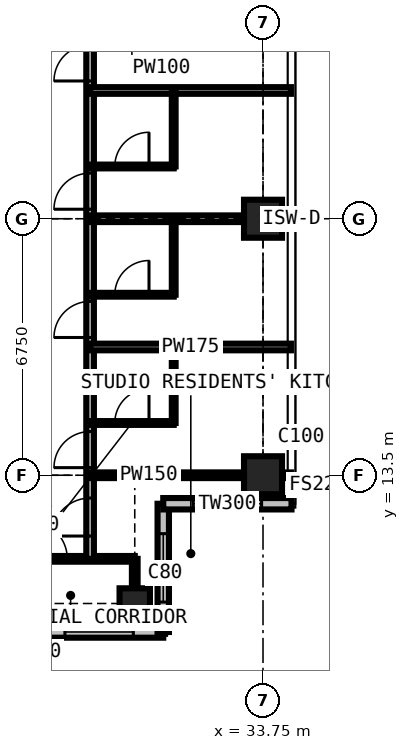
"""IFC4 building model, lengths in metres.
Left out: names, types, materials, properties, quantities, classifications, styles, units other than length and angle.
Written with IfcOpenShell. Run it as: python <this file> out.ifc"""

import sys

from ifc_helpers import new_model, si_unit, direction, frame, frame_2d, origin, origin_2d, place, context, subcontext, project, spatial, rectangle, extrude, element, fill, save


model = new_model("IFC4")
c1 = context("Model", 3, precision=1e-05, world=origin(), true_north=direction((0.0, 1.0)))
c2 = subcontext(c1, "Body", "Model", "MODEL_VIEW")
j1 = project(units=[si_unit("LENGTHUNIT", "METRE"), si_unit("PLANEANGLEUNIT", "RADIAN")], contexts=[c1])
p1 = place(None, origin())
s1 = spatial("IfcSite", under=j1, at=p1, CompositionType="ELEMENT")
p2 = place(p1, origin())
s2 = spatial("IfcBuilding", under=s1, at=p2, CompositionType="ELEMENT")
p3 = place(p2, frame((0.0, 0.0, 240.3)))
s3 = spatial("IfcBuildingStorey", under=s2, at=p3, CompositionType="ELEMENT", Elevation=240.3)
p4 = place(p3, frame((30.375, 10.125, 0.0), z_axis=(0.0, 0.0, 1.0), x_axis=(1.0, 0.0, 0.0)))
e1 = element("IfcColumn", 1, at=p4, inside=s3, PredefinedType="COLUMN", context=c2, shape_type="SweptSolid", body=[
    extrude(rectangle(XDim=0.8, YDim=0.8, at=origin_2d()), origin(), (0.0, 0.0, 1.0), 3.6),
])
for number, where, z_axis, x_axis in (
    (2, (33.75, 13.5, 0.0), (0.0, 0.0, 1.0), (1.0, 0.0, 0.0)),
    (3, (33.75, 20.25, 0.0), (0.0, 0.0, 1.0), (1.0, 0.0, 0.0)),
):
    element("IfcColumn", number, at=place(p3, frame(where, z_axis=z_axis, x_axis=x_axis)), inside=s3, PredefinedType="COLUMN", context=c2, shape_type="SweptSolid", body=[
        extrude(rectangle(XDim=1.0, YDim=1.0, at=origin_2d()), origin(), (0.0, 0.0, 1.0), 3.6),
    ])
p5 = place(p3, frame((27.75, 9.375, 0.0), z_axis=(0.0, 0.0, 1.0), x_axis=(1.0, 0.0, 0.0)))
e4 = element("IfcWall", 4, at=p5, inside=s3, PredefinedType="SOLIDWALL", context=c2, shape_type="SweptSolid", body=[
    extrude(rectangle(XDim=3.375, YDim=0.3, at=frame_2d((1.688, 0.0))), origin(), (0.0, 0.0, 1.0), 3.375),
])
p6 = place(p5, frame((0.788, 0.0, 0.6)))
e5 = element("IfcOpeningElement", 5, at=p6, cuts=e4, PredefinedType="OPENING", context=c2, shape_type="SweptSolid", body=[
    extrude(rectangle(XDim=1.8, YDim=2.1, at=frame_2d((0.9, 1.05))), frame((0.0, 0.16, 0.0), z_axis=(0.0, -1.0, 0.0), x_axis=(1.0, 0.0, 0.0)), (0.0, 0.0, 1.0), 0.32),
])
p7 = place(p3, frame((31.125, 9.375, 0.0), z_axis=(0.0, 0.0, 1.0), x_axis=(0.0, 1.0, 0.0)))
e6 = element("IfcWall", 6, at=p7, inside=s3, PredefinedType="SOLIDWALL", context=c2, shape_type="SweptSolid", body=[
    extrude(rectangle(XDim=3.375, YDim=0.3, at=frame_2d((1.688, 0.0))), origin(), (0.0, 0.0, 1.0), 3.375),
])
p8 = place(p7, frame((0.788, 0.0, 0.6)))
e7 = element("IfcOpeningElement", 7, at=p8, cuts=e6, PredefinedType="OPENING", context=c2, shape_type="SweptSolid", body=[
    extrude(rectangle(XDim=1.8, YDim=2.1, at=frame_2d((0.9, 1.05))), frame((0.0, 0.16, 0.0), z_axis=(0.0, -1.0, 0.0), x_axis=(1.0, 0.0, 0.0)), (0.0, 0.0, 1.0), 0.32),
])
p9 = place(p3, frame((31.125, 12.75, 0.0), z_axis=(0.0, 0.0, 1.0), x_axis=(1.0, 0.0, 0.0)))
e8 = element("IfcWall", 8, at=p9, inside=s3, PredefinedType="SOLIDWALL", context=c2, shape_type="SweptSolid", body=[
    extrude(rectangle(XDim=3.375, YDim=0.3, at=frame_2d((1.688, 0.0))), origin(), (0.0, 0.0, 1.0), 3.375),
])
p10 = place(p9, frame((0.788, 0.0, 0.6)))
e9 = element("IfcOpeningElement", 9, at=p10, cuts=e8, PredefinedType="OPENING", context=c2, shape_type="SweptSolid", body=[
    extrude(rectangle(XDim=1.8, YDim=2.1, at=frame_2d((0.9, 1.05))), frame((0.0, 0.16, 0.0), z_axis=(0.0, -1.0, 0.0), x_axis=(1.0, 0.0, 0.0)), (0.0, 0.0, 1.0), 0.32),
])
p11 = place(p3, frame((10.125, 11.3, 0.0), z_axis=(0.0, 0.0, 1.0), x_axis=(1.0, 0.0, 0.0)))
e10 = element("IfcWall", 10, at=p11, inside=s3, PredefinedType="PARTITIONING", context=c2, shape_type="SweptSolid", body=[
    extrude(rectangle(XDim=20.25, YDim=0.15, at=frame_2d((10.125, 0.0))), origin(), (0.0, 0.0, 1.0), 3.375),
])
p12 = place(p11, frame((6.95, 0.0, 0.0)))
e11 = element("IfcOpeningElement", 11, at=p12, cuts=e10, PredefinedType="OPENING", context=c2, shape_type="SweptSolid", body=[
    extrude(rectangle(XDim=0.95, YDim=2.2, at=frame_2d((0.475, 1.1))), frame((0.0, 0.085, 0.0), z_axis=(0.0, -1.0, 0.0), x_axis=(1.0, 0.0, 0.0)), (0.0, 0.0, 1.0), 0.17),
])
p13 = place(p11, frame((10.375, 0.0, 0.0)))
e12 = element("IfcOpeningElement", 12, at=p13, cuts=e10, PredefinedType="OPENING", context=c2, shape_type="SweptSolid", body=[
    extrude(rectangle(XDim=0.95, YDim=2.2, at=frame_2d((0.475, 1.1))), frame((0.0, 0.085, 0.0), z_axis=(0.0, -1.0, 0.0), x_axis=(1.0, 0.0, 0.0)), (0.0, 0.0, 1.0), 0.17),
])
p14 = place(p11, frame((13.75, 0.0, 0.0)))
e13 = element("IfcOpeningElement", 13, at=p14, cuts=e10, PredefinedType="OPENING", context=c2, shape_type="SweptSolid", body=[
    extrude(rectangle(XDim=0.95, YDim=2.2, at=frame_2d((0.475, 1.1))), frame((0.0, 0.085, 0.0), z_axis=(0.0, -1.0, 0.0), x_axis=(1.0, 0.0, 0.0)), (0.0, 0.0, 1.0), 0.17),
])
p15 = place(p11, frame((17.475, 0.0, 0.0)))
e14 = element("IfcOpeningElement", 14, at=p15, cuts=e10, PredefinedType="OPENING", context=c2, shape_type="SweptSolid", body=[
    extrude(rectangle(XDim=1.0, YDim=2.2, at=frame_2d((0.5, 1.1))), frame((0.0, 0.085, 0.0), z_axis=(0.0, -1.0, 0.0), x_axis=(1.0, 0.0, 0.0)), (0.0, 0.0, 1.0), 0.17),
])
p16 = place(p3, frame((29.2, 11.3, 0.0), z_axis=(0.0, 0.0, 1.0), x_axis=(0.0, 1.0, 0.0)))
e15 = element("IfcWall", 15, at=p16, inside=s3, PredefinedType="PARTITIONING", context=c2, shape_type="SweptSolid", body=[
    extrude(rectangle(XDim=17.9, YDim=0.2, at=frame_2d((8.95, 0.0))), origin(), (0.0, 0.0, 1.0), 3.375),
])
p17 = place(p16, frame((0.6, 0.0, 0.0)))
e16 = element("IfcOpeningElement", 16, at=p17, cuts=e15, PredefinedType="OPENING", context=c2, shape_type="SweptSolid", body=[
    extrude(rectangle(XDim=1.0, YDim=2.2, at=frame_2d((0.5, 1.1))), frame((0.0, 0.11, 0.0), z_axis=(0.0, -1.0, 0.0), x_axis=(1.0, 0.0, 0.0)), (0.0, 0.0, 1.0), 0.22),
])
p18 = place(p16, frame((2.4, 0.0, 0.0)))
e17 = element("IfcOpeningElement", 17, at=p18, cuts=e15, PredefinedType="OPENING", context=c2, shape_type="SweptSolid", body=[
    extrude(rectangle(XDim=0.95, YDim=2.2, at=frame_2d((0.475, 1.1))), frame((0.0, 0.11, 0.0), z_axis=(0.0, -1.0, 0.0), x_axis=(1.0, 0.0, 0.0)), (0.0, 0.0, 1.0), 0.22),
])
p19 = place(p16, frame((5.825, 0.0, 0.0)))
e18 = element("IfcOpeningElement", 18, at=p19, cuts=e15, PredefinedType="OPENING", context=c2, shape_type="SweptSolid", body=[
    extrude(rectangle(XDim=0.95, YDim=2.2, at=frame_2d((0.475, 1.1))), frame((0.0, 0.11, 0.0), z_axis=(0.0, -1.0, 0.0), x_axis=(1.0, 0.0, 0.0)), (0.0, 0.0, 1.0), 0.22),
])
p20 = place(p16, frame((9.2, 0.0, 0.0)))
e19 = element("IfcOpeningElement", 19, at=p20, cuts=e15, PredefinedType="OPENING", context=c2, shape_type="SweptSolid", body=[
    extrude(rectangle(XDim=0.95, YDim=2.2, at=frame_2d((0.475, 1.1))), frame((0.0, 0.11, 0.0), z_axis=(0.0, -1.0, 0.0), x_axis=(1.0, 0.0, 0.0)), (0.0, 0.0, 1.0), 0.22),
])
p21 = place(p16, frame((12.575, 0.0, 0.0)))
e20 = element("IfcOpeningElement", 20, at=p21, cuts=e15, PredefinedType="OPENING", context=c2, shape_type="SweptSolid", body=[
    extrude(rectangle(XDim=0.95, YDim=2.2, at=frame_2d((0.475, 1.1))), frame((0.0, 0.11, 0.0), z_axis=(0.0, -1.0, 0.0), x_axis=(1.0, 0.0, 0.0)), (0.0, 0.0, 1.0), 0.22),
])
p22 = place(p16, frame((16.3, 0.0, 0.0)))
e21 = element("IfcOpeningElement", 21, at=p22, cuts=e15, PredefinedType="OPENING", context=c2, shape_type="SweptSolid", body=[
    extrude(rectangle(XDim=1.0, YDim=2.2, at=frame_2d((0.5, 1.1))), frame((0.0, 0.11, 0.0), z_axis=(0.0, -1.0, 0.0), x_axis=(1.0, 0.0, 0.0)), (0.0, 0.0, 1.0), 0.22),
])
p23 = place(p3, frame((29.2, 13.5, 0.0), z_axis=(0.0, 0.0, 1.0), x_axis=(1.0, 0.0, 0.0)))
e22 = element("IfcWall", 22, at=p23, inside=s3, PredefinedType="PARTITIONING", context=c2, shape_type="SweptSolid", body=[
    extrude(rectangle(XDim=5.284, YDim=0.15, at=frame_2d((2.642, 0.0))), origin(), (0.0, 0.0, 1.0), 2.877),
])
p24 = place(p3, frame((29.2, 14.875, 0.0), z_axis=(0.0, 0.0, 1.0), x_axis=(1.0, 0.0, 0.0)))
e23 = element("IfcWall", 23, at=p24, inside=s3, PredefinedType="PARTITIONING", context=c2, shape_type="SweptSolid", body=[
    extrude(rectangle(XDim=2.2, YDim=0.1, at=frame_2d((1.1, 0.0))), origin(), (0.0, 0.0, 1.0), 3.375),
])
p25 = place(p24, frame((0.65, 0.0, 0.0)))
e24 = element("IfcOpeningElement", 24, at=p25, cuts=e23, PredefinedType="OPENING", context=c2, shape_type="SweptSolid", body=[
    extrude(rectangle(XDim=0.9, YDim=2.2, at=frame_2d((0.45, 1.1))), frame((0.0, 0.06, 0.0), z_axis=(0.0, -1.0, 0.0), x_axis=(1.0, 0.0, 0.0)), (0.0, 0.0, 1.0), 0.12),
])
p26 = place(p3, frame((29.2, 16.875, 0.0), z_axis=(0.0, 0.0, 1.0), x_axis=(1.0, 0.0, 0.0)))
e25 = element("IfcWall", 25, at=p26, inside=s3, PredefinedType="PARTITIONING", context=c2, shape_type="SweptSolid", body=[
    extrude(rectangle(XDim=5.284, YDim=0.175, at=frame_2d((2.642, 0.0))), origin(), (0.0, 0.0, 1.0), 3.375),
])
p27 = place(p3, frame((29.2, 18.25, 0.0), z_axis=(0.0, 0.0, 1.0), x_axis=(1.0, 0.0, 0.0)))
e26 = element("IfcWall", 26, at=p27, inside=s3, PredefinedType="PARTITIONING", context=c2, shape_type="SweptSolid", body=[
    extrude(rectangle(XDim=2.2, YDim=0.1, at=frame_2d((1.1, 0.0))), origin(), (0.0, 0.0, 1.0), 3.375),
])
p28 = place(p27, frame((0.65, 0.0, 0.0)))
e27 = element("IfcOpeningElement", 27, at=p28, cuts=e26, PredefinedType="OPENING", context=c2, shape_type="SweptSolid", body=[
    extrude(rectangle(XDim=0.9, YDim=2.2, at=frame_2d((0.45, 1.1))), frame((0.0, 0.06, 0.0), z_axis=(0.0, -1.0, 0.0), x_axis=(1.0, 0.0, 0.0)), (0.0, 0.0, 1.0), 0.12),
])
p29 = place(p3, frame((29.2, 20.25, 0.0), z_axis=(0.0, 0.0, 1.0), x_axis=(1.0, 0.0, 0.0)))
e28 = element("IfcWall", 28, at=p29, inside=s3, PredefinedType="PARTITIONING", context=c2, shape_type="SweptSolid", body=[
    extrude(rectangle(XDim=5.284, YDim=0.175, at=frame_2d((2.642, 0.0))), origin(), (0.0, 0.0, 1.0), 2.877),
])
p30 = place(p3, frame((29.2, 21.625, 0.0), z_axis=(0.0, 0.0, 1.0), x_axis=(1.0, 0.0, 0.0)))
e29 = element("IfcWall", 29, at=p30, inside=s3, PredefinedType="PARTITIONING", context=c2, shape_type="SweptSolid", body=[
    extrude(rectangle(XDim=2.2, YDim=0.1, at=frame_2d((1.1, 0.0))), origin(), (0.0, 0.0, 1.0), 3.375),
])
p31 = place(p30, frame((0.65, 0.0, 0.0)))
e30 = element("IfcOpeningElement", 30, at=p31, cuts=e29, PredefinedType="OPENING", context=c2, shape_type="SweptSolid", body=[
    extrude(rectangle(XDim=0.9, YDim=2.2, at=frame_2d((0.45, 1.1))), frame((0.0, 0.06, 0.0), z_axis=(0.0, -1.0, 0.0), x_axis=(1.0, 0.0, 0.0)), (0.0, 0.0, 1.0), 0.12),
])
p32 = place(p3, frame((29.2, 23.625, 0.0), z_axis=(0.0, 0.0, 1.0), x_axis=(1.0, 0.0, 0.0)))
e31 = element("IfcWall", 31, at=p32, inside=s3, PredefinedType="PARTITIONING", context=c2, shape_type="SweptSolid", body=[
    extrude(rectangle(XDim=5.284, YDim=0.175, at=frame_2d((2.642, 0.0))), origin(), (0.0, 0.0, 1.0), 3.375),
])
p33 = place(p3, frame((30.375, 9.525, 0.0), z_axis=(0.0, 0.0, 1.0), x_axis=(0.0, 1.0, 0.0)))
e32 = element("IfcWall", 32, at=p33, inside=s3, PredefinedType="PARTITIONING", context=c2, shape_type="SweptSolid", body=[
    extrude(rectangle(XDim=1.775, YDim=0.15, at=frame_2d((0.888, 0.0))), origin(), (0.0, 0.0, 1.0), 2.877),
])
for number, where, z_axis, x_axis in (
    (33, (31.4, 14.875, 0.0), (0.0, 0.0, 1.0), (0.0, 1.0, 0.0)),
    (34, (31.4, 18.25, 0.0), (0.0, 0.0, 1.0), (0.0, 1.0, 0.0)),
    (35, (31.4, 21.625, 0.0), (0.0, 0.0, 1.0), (0.0, 1.0, 0.0)),
):
    element("IfcWall", number, at=place(p3, frame(where, z_axis=z_axis, x_axis=x_axis)), inside=s3, PredefinedType="PARTITIONING", context=c2, shape_type="SweptSolid", body=[
        extrude(rectangle(XDim=2.0, YDim=0.1, at=frame_2d((1.0, 0.0))), origin(), (0.0, 0.0, 1.0), 3.375),
    ])
p34 = place(p6, origin())
e36 = element("IfcWindow", 36, at=p34, inside=s3, PartitioningType="SINGLE_PANEL", PredefinedType="WINDOW", context=c2, shape_type="SweptSolid", body=[
    extrude(rectangle(XDim=1.8, YDim=2.1, at=frame_2d((0.9, 1.05))), frame((0.0, 0.03, 0.0), z_axis=(0.0, -1.0, 0.0), x_axis=(1.0, 0.0, 0.0)), (0.0, 0.0, 1.0), 0.06),
])
fill(e5, e36)
p35 = place(p8, origin())
e37 = element("IfcWindow", 37, at=p35, inside=s3, PartitioningType="SINGLE_PANEL", PredefinedType="WINDOW", context=c2, shape_type="SweptSolid", body=[
    extrude(rectangle(XDim=1.8, YDim=2.1, at=frame_2d((0.9, 1.05))), frame((0.0, 0.03, 0.0), z_axis=(0.0, -1.0, 0.0), x_axis=(1.0, 0.0, 0.0)), (0.0, 0.0, 1.0), 0.06),
])
fill(e7, e37)
p36 = place(p10, origin())
e38 = element("IfcWindow", 38, at=p36, inside=s3, PartitioningType="SINGLE_PANEL", PredefinedType="WINDOW", context=c2, shape_type="SweptSolid", body=[
    extrude(rectangle(XDim=1.8, YDim=2.1, at=frame_2d((0.9, 1.05))), frame((0.0, 0.03, 0.0), z_axis=(0.0, -1.0, 0.0), x_axis=(1.0, 0.0, 0.0)), (0.0, 0.0, 1.0), 0.06),
])
fill(e9, e38)
p37 = place(p15, origin())
e39 = element("IfcDoor", 39, at=p37, inside=s3, OperationType="SINGLE_SWING_LEFT", PredefinedType="DOOR", context=c2, shape_type="SweptSolid", body=[
    extrude(rectangle(XDim=1.0, YDim=2.2, at=frame_2d((0.5, 1.1))), frame((0.0, 0.025, 0.0), z_axis=(0.0, -1.0, 0.0), x_axis=(1.0, 0.0, 0.0)), (0.0, 0.0, 1.0), 0.05),
])
fill(e14, e39)
p38 = place(p17, origin())
e40 = element("IfcDoor", 40, at=p38, inside=s3, OperationType="SINGLE_SWING_LEFT", PredefinedType="DOOR", context=c2, shape_type="SweptSolid", body=[
    extrude(rectangle(XDim=1.0, YDim=2.2, at=frame_2d((0.5, 1.1))), frame((0.0, 0.025, 0.0), z_axis=(0.0, -1.0, 0.0), x_axis=(1.0, 0.0, 0.0)), (0.0, 0.0, 1.0), 0.05),
])
fill(e16, e40)
p39 = place(p18, origin())
e41 = element("IfcDoor", 41, at=p39, inside=s3, OperationType="SINGLE_SWING_LEFT", PredefinedType="DOOR", context=c2, shape_type="SweptSolid", body=[
    extrude(rectangle(XDim=0.95, YDim=2.2, at=frame_2d((0.475, 1.1))), frame((0.0, 0.025, 0.0), z_axis=(0.0, -1.0, 0.0), x_axis=(1.0, 0.0, 0.0)), (0.0, 0.0, 1.0), 0.05),
])
fill(e17, e41)
p40 = place(p25, origin())
e42 = element("IfcDoor", 42, at=p40, inside=s3, OperationType="SINGLE_SWING_RIGHT", PredefinedType="DOOR", context=c2, shape_type="SweptSolid", body=[
    extrude(rectangle(XDim=0.9, YDim=2.2, at=frame_2d((0.45, 1.1))), frame((0.0, 0.025, 0.0), z_axis=(0.0, -1.0, 0.0), x_axis=(1.0, 0.0, 0.0)), (0.0, 0.0, 1.0), 0.05),
])
fill(e24, e42)
p41 = place(p19, origin())
e43 = element("IfcDoor", 43, at=p41, inside=s3, OperationType="SINGLE_SWING_LEFT", PredefinedType="DOOR", context=c2, shape_type="SweptSolid", body=[
    extrude(rectangle(XDim=0.95, YDim=2.2, at=frame_2d((0.475, 1.1))), frame((0.0, 0.025, 0.0), z_axis=(0.0, -1.0, 0.0), x_axis=(1.0, 0.0, 0.0)), (0.0, 0.0, 1.0), 0.05),
])
fill(e18, e43)
p42 = place(p28, origin())
e44 = element("IfcDoor", 44, at=p42, inside=s3, OperationType="SINGLE_SWING_RIGHT", PredefinedType="DOOR", context=c2, shape_type="SweptSolid", body=[
    extrude(rectangle(XDim=0.9, YDim=2.2, at=frame_2d((0.45, 1.1))), frame((0.0, 0.025, 0.0), z_axis=(0.0, -1.0, 0.0), x_axis=(1.0, 0.0, 0.0)), (0.0, 0.0, 1.0), 0.05),
])
fill(e27, e44)
p43 = place(p20, origin())
e45 = element("IfcDoor", 45, at=p43, inside=s3, OperationType="SINGLE_SWING_LEFT", PredefinedType="DOOR", context=c2, shape_type="SweptSolid", body=[
    extrude(rectangle(XDim=0.95, YDim=2.2, at=frame_2d((0.475, 1.1))), frame((0.0, 0.025, 0.0), z_axis=(0.0, -1.0, 0.0), x_axis=(1.0, 0.0, 0.0)), (0.0, 0.0, 1.0), 0.05),
])
fill(e19, e45)
p44 = place(p31, origin())
e46 = element("IfcDoor", 46, at=p44, inside=s3, OperationType="SINGLE_SWING_RIGHT", PredefinedType="DOOR", context=c2, shape_type="SweptSolid", body=[
    extrude(rectangle(XDim=0.9, YDim=2.2, at=frame_2d((0.45, 1.1))), frame((0.0, 0.025, 0.0), z_axis=(0.0, -1.0, 0.0), x_axis=(1.0, 0.0, 0.0)), (0.0, 0.0, 1.0), 0.05),
])
fill(e30, e46)
p45 = place(p21, origin())
e47 = element("IfcDoor", 47, at=p45, inside=s3, OperationType="SINGLE_SWING_LEFT", PredefinedType="DOOR", context=c2, shape_type="SweptSolid", body=[
    extrude(rectangle(XDim=0.95, YDim=2.2, at=frame_2d((0.475, 1.1))), frame((0.0, 0.025, 0.0), z_axis=(0.0, -1.0, 0.0), x_axis=(1.0, 0.0, 0.0)), (0.0, 0.0, 1.0), 0.05),
])
fill(e20, e47)
save(model, sys.argv[1])
